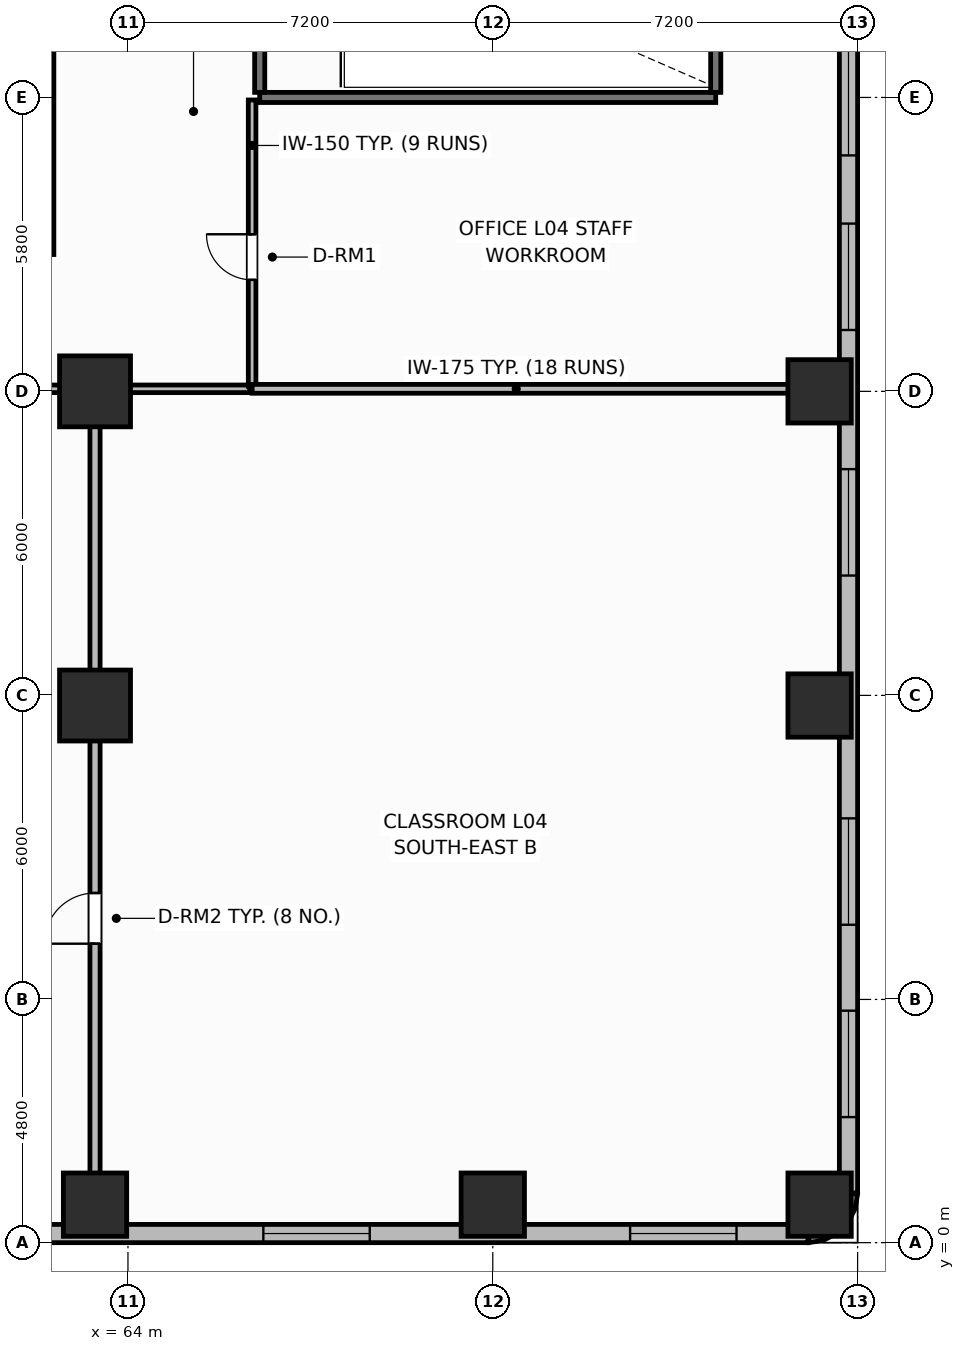
"""IFC4 building model, lengths in metres.
Left out: names, types, materials, properties, quantities, classifications, styles, units other than length and angle.
Written with IfcOpenShell. Run it as: python <this file> out.ifc"""

import sys

from ifc_helpers import new_model, si_unit, direction, frame, frame_2d, origin, origin_2d, place, context, subcontext, project, spatial, rectangle, extrude, element, fill, save


model = new_model("IFC4")
c1 = context("Model", 3, precision=1e-05, world=origin(), true_north=direction((0.0, 1.0)))
c2 = subcontext(c1, "Body", "Model", "MODEL_VIEW")
j1 = project(units=[si_unit("LENGTHUNIT", "METRE"), si_unit("PLANEANGLEUNIT", "RADIAN")], contexts=[c1])
p1 = place(None, origin())
s1 = spatial("IfcSite", under=j1, at=p1, CompositionType="ELEMENT")
p2 = place(p1, origin())
s2 = spatial("IfcBuilding", under=s1, at=p2, CompositionType="ELEMENT")
p3 = place(p2, frame((0.0, 0.0, 20.1)))
s3 = spatial("IfcBuildingStorey", under=s2, at=p3, CompositionType="ELEMENT", Elevation=20.1)
for number, where, z_axis, x_axis in (
    (1, (63.35, 0.75, 0.0), (0.0, 0.0, 1.0), (1.0, 0.0, 0.0)),
    (2, (71.2, 0.75, 0.0), (0.0, 0.0, 1.0), (1.0, 0.0, 0.0)),
    (3, (77.65, 0.75, 0.0), (0.0, 0.0, 1.0), (1.0, 0.0, 0.0)),
    (4, (77.65, 10.6, 0.0), (0.0, 0.0, 1.0), (1.0, 0.0, 0.0)),
    (5, (77.65, 16.8, 0.0), (0.0, 0.0, 1.0), (1.0, 0.0, 0.0)),
):
    element("IfcColumn", number, at=place(p3, frame(where, z_axis=z_axis, x_axis=x_axis)), inside=s3, PredefinedType="COLUMN", context=c2, shape_type="SweptSolid", body=[
        extrude(rectangle(XDim=1.25, YDim=1.25, at=origin_2d()), origin(), (0.0, 0.0, 1.0), 4.5),
    ])
for number, where, z_axis, x_axis in (
    (6, (63.35, 10.6, 0.0), (0.0, 0.0, 1.0), (1.0, 0.0, 0.0)),
    (7, (63.35, 16.8, 0.0), (0.0, 0.0, 1.0), (1.0, 0.0, 0.0)),
):
    element("IfcColumn", number, at=place(p3, frame(where, z_axis=z_axis, x_axis=x_axis)), inside=s3, PredefinedType="COLUMN", context=c2, shape_type="SweptSolid", body=[
        extrude(rectangle(XDim=1.4, YDim=1.4, at=origin_2d()), origin(), (0.0, 0.0, 1.0), 4.5),
    ])
p4 = place(p3, frame((21.83, 0.18, 0.0), z_axis=(0.0, 0.0, 1.0), x_axis=(1.0, 0.0, 0.0)))
e8 = element("IfcWall", 8, at=p4, inside=s3, PredefinedType="SOLIDWALL", context=c2, shape_type="SweptSolid", body=[
    extrude(rectangle(XDim=55.59, YDim=0.36, at=frame_2d((27.795, 0.0))), origin(), (0.0, 0.0, 1.0), 2.3),
])
p5 = place(p4, frame((5.029, 0.0, 0.3)))
e9 = element("IfcOpeningElement", 9, at=p5, cuts=e8, PredefinedType="OPENING", context=c2, shape_type="SweptSolid", body=[
    extrude(rectangle(XDim=2.1, YDim=2.2, at=frame_2d((1.05, 1.1))), frame((0.0, 0.19, 0.0), z_axis=(0.0, -1.0, 0.0), x_axis=(1.0, 0.0, 0.0)), (0.0, 0.0, 1.0), 0.38),
])
p6 = place(p4, frame((8.648, 0.0, 0.3)))
e10 = element("IfcOpeningElement", 10, at=p6, cuts=e8, PredefinedType="OPENING", context=c2, shape_type="SweptSolid", body=[
    extrude(rectangle(XDim=2.1, YDim=2.2, at=frame_2d((1.05, 1.1))), frame((0.0, 0.19, 0.0), z_axis=(0.0, -1.0, 0.0), x_axis=(1.0, 0.0, 0.0)), (0.0, 0.0, 1.0), 0.38),
])
p7 = place(p4, frame((12.268, 0.0, 0.3)))
e11 = element("IfcOpeningElement", 11, at=p7, cuts=e8, PredefinedType="OPENING", context=c2, shape_type="SweptSolid", body=[
    extrude(rectangle(XDim=2.1, YDim=2.2, at=frame_2d((1.05, 1.1))), frame((0.0, 0.19, 0.0), z_axis=(0.0, -1.0, 0.0), x_axis=(1.0, 0.0, 0.0)), (0.0, 0.0, 1.0), 0.38),
])
p8 = place(p4, frame((19.506, 0.0, 0.3)))
e12 = element("IfcOpeningElement", 12, at=p8, cuts=e8, PredefinedType="OPENING", context=c2, shape_type="SweptSolid", body=[
    extrude(rectangle(XDim=2.1, YDim=2.2, at=frame_2d((1.05, 1.1))), frame((0.0, 0.19, 0.0), z_axis=(0.0, -1.0, 0.0), x_axis=(1.0, 0.0, 0.0)), (0.0, 0.0, 1.0), 0.38),
])
p9 = place(p4, frame((23.126, 0.0, 0.3)))
e13 = element("IfcOpeningElement", 13, at=p9, cuts=e8, PredefinedType="OPENING", context=c2, shape_type="SweptSolid", body=[
    extrude(rectangle(XDim=2.1, YDim=2.2, at=frame_2d((1.05, 1.1))), frame((0.0, 0.19, 0.0), z_axis=(0.0, -1.0, 0.0), x_axis=(1.0, 0.0, 0.0)), (0.0, 0.0, 1.0), 0.38),
])
p10 = place(p4, frame((26.745, 0.0, 0.3)))
e14 = element("IfcOpeningElement", 14, at=p10, cuts=e8, PredefinedType="OPENING", context=c2, shape_type="SweptSolid", body=[
    extrude(rectangle(XDim=2.1, YDim=2.2, at=frame_2d((1.05, 1.1))), frame((0.0, 0.19, 0.0), z_axis=(0.0, -1.0, 0.0), x_axis=(1.0, 0.0, 0.0)), (0.0, 0.0, 1.0), 0.38),
])
p11 = place(p4, frame((33.984, 0.0, 0.3)))
e15 = element("IfcOpeningElement", 15, at=p11, cuts=e8, PredefinedType="OPENING", context=c2, shape_type="SweptSolid", body=[
    extrude(rectangle(XDim=2.1, YDim=2.2, at=frame_2d((1.05, 1.1))), frame((0.0, 0.19, 0.0), z_axis=(0.0, -1.0, 0.0), x_axis=(1.0, 0.0, 0.0)), (0.0, 0.0, 1.0), 0.38),
])
p12 = place(p4, frame((37.603, 0.0, 0.3)))
e16 = element("IfcOpeningElement", 16, at=p12, cuts=e8, PredefinedType="OPENING", context=c2, shape_type="SweptSolid", body=[
    extrude(rectangle(XDim=2.1, YDim=2.2, at=frame_2d((1.05, 1.1))), frame((0.0, 0.19, 0.0), z_axis=(0.0, -1.0, 0.0), x_axis=(1.0, 0.0, 0.0)), (0.0, 0.0, 1.0), 0.38),
])
p13 = place(p4, frame((44.842, 0.0, 0.3)))
e17 = element("IfcOpeningElement", 17, at=p13, cuts=e8, PredefinedType="OPENING", context=c2, shape_type="SweptSolid", body=[
    extrude(rectangle(XDim=2.1, YDim=2.2, at=frame_2d((1.05, 1.1))), frame((0.0, 0.19, 0.0), z_axis=(0.0, -1.0, 0.0), x_axis=(1.0, 0.0, 0.0)), (0.0, 0.0, 1.0), 0.38),
])
p14 = place(p4, frame((52.08, 0.0, 0.3)))
e18 = element("IfcOpeningElement", 18, at=p14, cuts=e8, PredefinedType="OPENING", context=c2, shape_type="SweptSolid", body=[
    extrude(rectangle(XDim=2.1, YDim=2.2, at=frame_2d((1.05, 1.1))), frame((0.0, 0.19, 0.0), z_axis=(0.0, -1.0, 0.0), x_axis=(1.0, 0.0, 0.0)), (0.0, 0.0, 1.0), 0.38),
])
p15 = place(p3, frame((77.42, 0.18, 0.0), z_axis=(0.0, 0.0, 1.0), x_axis=(0.987604361038, 0.156963773077, 0.0)))
e19 = element("IfcWall", 19, at=p15, inside=s3, PredefinedType="SOLIDWALL", context=c2, shape_type="SweptSolid", body=[
    extrude(rectangle(XDim=0.25, YDim=0.36, at=frame_2d((0.125, 0.0))), origin(), (0.0, 0.0, 1.0), 2.3),
])
for number, where, z_axis, x_axis in (
    (20, (77.667, 0.219, 0.0), (0.0, 0.0, 1.0), (0.891, 0.454, 0.0)),
    (21, (77.89, 0.333, 0.0), (0.0, 0.0, 1.0), (0.707, 0.707, 0.0)),
):
    element("IfcWall", number, at=place(p3, frame(where, z_axis=z_axis, x_axis=x_axis)), inside=s3, PredefinedType="SOLIDWALL", context=c2, shape_type="SweptSolid", body=[
        extrude(rectangle(XDim=0.25, YDim=0.36, at=frame_2d((0.125, 0.0))), origin(), (0.0, 0.0, 1.0), 2.3),
    ])
p16 = place(p3, frame((78.067, 0.51, 0.0), z_axis=(0.0, 0.0, 1.0), x_axis=(0.454217786225, 0.89089067942, 0.0)))
e22 = element("IfcWall", 22, at=p16, inside=s3, PredefinedType="SOLIDWALL", context=c2, shape_type="SweptSolid", body=[
    extrude(rectangle(XDim=0.25, YDim=0.36, at=frame_2d((0.125, 0.0))), origin(), (0.0, 0.0, 1.0), 2.3),
])
p17 = place(p3, frame((78.181, 0.733, 0.0), z_axis=(0.0, 0.0, 1.0), x_axis=(0.156163049852, 0.987731290312, 0.0)))
e23 = element("IfcWall", 23, at=p17, inside=s3, PredefinedType="SOLIDWALL", context=c2, shape_type="SweptSolid", body=[
    extrude(rectangle(XDim=0.25, YDim=0.36, at=frame_2d((0.125, 0.0))), origin(), (0.0, 0.0, 1.0), 2.3),
])
p18 = place(p3, frame((78.22, 0.98, 0.0), z_axis=(0.0, 0.0, 1.0), x_axis=(0.0, 1.0, 0.0)))
e24 = element("IfcWall", 24, at=p18, inside=s3, PredefinedType="SOLIDWALL", context=c2, shape_type="SweptSolid", body=[
    extrude(rectangle(XDim=54.44, YDim=0.36, at=frame_2d((27.22, 0.0))), origin(), (0.0, 0.0, 1.0), 2.3),
])
p19 = place(p18, frame((1.498, 0.0, 0.3)))
e25 = element("IfcOpeningElement", 25, at=p19, cuts=e24, PredefinedType="OPENING", context=c2, shape_type="SweptSolid", body=[
    extrude(rectangle(XDim=2.1, YDim=2.2, at=frame_2d((1.05, 1.1))), frame((0.0, 0.19, 0.0), z_axis=(0.0, -1.0, 0.0), x_axis=(1.0, 0.0, 0.0)), (0.0, 0.0, 1.0), 0.38),
])
p20 = place(p18, frame((5.294, 0.0, 0.3)))
e26 = element("IfcOpeningElement", 26, at=p20, cuts=e24, PredefinedType="OPENING", context=c2, shape_type="SweptSolid", body=[
    extrude(rectangle(XDim=2.1, YDim=2.2, at=frame_2d((1.05, 1.1))), frame((0.0, 0.19, 0.0), z_axis=(0.0, -1.0, 0.0), x_axis=(1.0, 0.0, 0.0)), (0.0, 0.0, 1.0), 0.38),
])
p21 = place(p18, frame((12.185, 0.0, 0.3)))
e27 = element("IfcOpeningElement", 27, at=p21, cuts=e24, PredefinedType="OPENING", context=c2, shape_type="SweptSolid", body=[
    extrude(rectangle(XDim=2.1, YDim=2.2, at=frame_2d((1.05, 1.1))), frame((0.0, 0.19, 0.0), z_axis=(0.0, -1.0, 0.0), x_axis=(1.0, 0.0, 0.0)), (0.0, 0.0, 1.0), 0.38),
])
p22 = place(p18, frame((17.031, 0.0, 0.3)))
e28 = element("IfcOpeningElement", 28, at=p22, cuts=e24, PredefinedType="OPENING", context=c2, shape_type="SweptSolid", body=[
    extrude(rectangle(XDim=2.1, YDim=2.2, at=frame_2d((1.05, 1.1))), frame((0.0, 0.19, 0.0), z_axis=(0.0, -1.0, 0.0), x_axis=(1.0, 0.0, 0.0)), (0.0, 0.0, 1.0), 0.38),
])
p23 = place(p18, frame((20.476, 0.0, 0.3)))
e29 = element("IfcOpeningElement", 29, at=p23, cuts=e24, PredefinedType="OPENING", context=c2, shape_type="SweptSolid", body=[
    extrude(rectangle(XDim=2.1, YDim=2.2, at=frame_2d((1.05, 1.1))), frame((0.0, 0.19, 0.0), z_axis=(0.0, -1.0, 0.0), x_axis=(1.0, 0.0, 0.0)), (0.0, 0.0, 1.0), 0.38),
])
p24 = place(p18, frame((23.572, 0.0, 0.3)))
e30 = element("IfcOpeningElement", 30, at=p24, cuts=e24, PredefinedType="OPENING", context=c2, shape_type="SweptSolid", body=[
    extrude(rectangle(XDim=2.1, YDim=2.2, at=frame_2d((1.05, 1.1))), frame((0.0, 0.19, 0.0), z_axis=(0.0, -1.0, 0.0), x_axis=(1.0, 0.0, 0.0)), (0.0, 0.0, 1.0), 0.38),
])
p25 = place(p18, frame((28.768, 0.0, 0.3)))
e31 = element("IfcOpeningElement", 31, at=p25, cuts=e24, PredefinedType="OPENING", context=c2, shape_type="SweptSolid", body=[
    extrude(rectangle(XDim=2.1, YDim=2.2, at=frame_2d((1.05, 1.1))), frame((0.0, 0.19, 0.0), z_axis=(0.0, -1.0, 0.0), x_axis=(1.0, 0.0, 0.0)), (0.0, 0.0, 1.0), 0.38),
])
p26 = place(p18, frame((31.864, 0.0, 0.3)))
e32 = element("IfcOpeningElement", 32, at=p26, cuts=e24, PredefinedType="OPENING", context=c2, shape_type="SweptSolid", body=[
    extrude(rectangle(XDim=2.1, YDim=2.2, at=frame_2d((1.05, 1.1))), frame((0.0, 0.19, 0.0), z_axis=(0.0, -1.0, 0.0), x_axis=(1.0, 0.0, 0.0)), (0.0, 0.0, 1.0), 0.38),
])
p27 = place(p18, frame((35.309, 0.0, 0.3)))
e33 = element("IfcOpeningElement", 33, at=p27, cuts=e24, PredefinedType="OPENING", context=c2, shape_type="SweptSolid", body=[
    extrude(rectangle(XDim=2.1, YDim=2.2, at=frame_2d((1.05, 1.1))), frame((0.0, 0.19, 0.0), z_axis=(0.0, -1.0, 0.0), x_axis=(1.0, 0.0, 0.0)), (0.0, 0.0, 1.0), 0.38),
])
p28 = place(p18, frame((40.155, 0.0, 0.3)))
e34 = element("IfcOpeningElement", 34, at=p28, cuts=e24, PredefinedType="OPENING", context=c2, shape_type="SweptSolid", body=[
    extrude(rectangle(XDim=2.1, YDim=2.2, at=frame_2d((1.05, 1.1))), frame((0.0, 0.19, 0.0), z_axis=(0.0, -1.0, 0.0), x_axis=(1.0, 0.0, 0.0)), (0.0, 0.0, 1.0), 0.38),
])
p29 = place(p18, frame((47.046, 0.0, 0.3)))
e35 = element("IfcOpeningElement", 35, at=p29, cuts=e24, PredefinedType="OPENING", context=c2, shape_type="SweptSolid", body=[
    extrude(rectangle(XDim=2.1, YDim=2.2, at=frame_2d((1.05, 1.1))), frame((0.0, 0.19, 0.0), z_axis=(0.0, -1.0, 0.0), x_axis=(1.0, 0.0, 0.0)), (0.0, 0.0, 1.0), 0.38),
])
p30 = place(p18, frame((50.842, 0.0, 0.3)))
e36 = element("IfcOpeningElement", 36, at=p30, cuts=e24, PredefinedType="OPENING", context=c2, shape_type="SweptSolid", body=[
    extrude(rectangle(XDim=2.1, YDim=2.2, at=frame_2d((1.05, 1.1))), frame((0.0, 0.19, 0.0), z_axis=(0.0, -1.0, 0.0), x_axis=(1.0, 0.0, 0.0)), (0.0, 0.0, 1.0), 0.38),
])
p31 = place(p3, frame((66.6, 22.6, 0.0), z_axis=(0.0, 0.0, 1.0), x_axis=(1.0, 0.0, 0.0)))
e37 = element("IfcWall", 37, at=p31, inside=s3, PredefinedType="SHEAR", context=c2, shape_type="SweptSolid", body=[
    extrude(rectangle(XDim=9.0, YDim=0.2, at=frame_2d((4.5, 0.0))), origin(), (0.0, 0.0, 1.0), 4.5),
])
for number, where, z_axis, x_axis in (
    (38, (66.6, 22.7, 0.0), (0.0, 0.0, 1.0), (0.0, 1.0, 0.0)),
    (39, (75.6, 22.7, 0.0), (0.0, 0.0, 1.0), (0.0, 1.0, 0.0)),
):
    element("IfcWall", number, at=place(p3, frame(where, z_axis=z_axis, x_axis=x_axis)), inside=s3, PredefinedType="SHEAR", context=c2, shape_type="SweptSolid", body=[
        extrude(rectangle(XDim=3.4, YDim=0.2, at=frame_2d((1.7, 0.0))), origin(), (0.0, 0.0, 1.0), 4.5),
    ])
p32 = place(p3, frame((62.45, 19.5, 0.0), z_axis=(0.0, 0.0, 1.0), x_axis=(0.0, 1.0, 0.0)))
e40 = element("IfcWall", 40, at=p32, inside=s3, PredefinedType="PARTITIONING", context=c2, shape_type="SweptSolid", body=[
    extrude(rectangle(XDim=17.4, YDim=0.175, at=frame_2d((8.7, 0.0))), origin(), (0.0, 0.0, 1.0), 2.26),
])
p33 = place(p3, frame((63.35, 0.4, 0.0), z_axis=(0.0, 0.0, 1.0), x_axis=(0.0, 1.0, 0.0)))
e41 = element("IfcWall", 41, at=p33, inside=s3, PredefinedType="PARTITIONING", context=c2, shape_type="SweptSolid", body=[
    extrude(rectangle(XDim=16.4, YDim=0.2, at=frame_2d((8.2, 0.0))), origin(), (0.0, 0.0, 1.0), 2.26),
])
p34 = place(p33, frame((5.5, 0.0, 0.0)))
e42 = element("IfcOpeningElement", 42, at=p34, cuts=e41, PredefinedType="OPENING", context=c2, shape_type="SweptSolid", body=[
    extrude(rectangle(XDim=1.0, YDim=2.15, at=frame_2d((0.5, 1.075))), frame((0.0, 0.11, 0.0), z_axis=(0.0, -1.0, 0.0), x_axis=(1.0, 0.0, 0.0)), (0.0, 0.0, 1.0), 0.22),
])
p35 = place(p3, frame((53.15, 16.85, 0.0), z_axis=(0.0, 0.0, 1.0), x_axis=(1.0, 0.0, 0.0)))
e43 = element("IfcWall", 43, at=p35, inside=s3, PredefinedType="PARTITIONING", context=c2, shape_type="SweptSolid", body=[
    extrude(rectangle(XDim=13.25, YDim=0.15, at=frame_2d((6.625, 0.0))), origin(), (0.0, 0.0, 1.0), 2.26),
])
p36 = place(p35, frame((4.2, 0.0, 0.0)))
e44 = element("IfcOpeningElement", 44, at=p36, cuts=e43, PredefinedType="OPENING", context=c2, shape_type="SweptSolid", body=[
    extrude(rectangle(XDim=1.0, YDim=2.15, at=frame_2d((0.5, 1.075))), frame((0.0, 0.085, 0.0), z_axis=(0.0, -1.0, 0.0), x_axis=(1.0, 0.0, 0.0)), (0.0, 0.0, 1.0), 0.17),
])
p37 = place(p3, frame((66.45, 16.9, 0.0), z_axis=(0.0, 0.0, 1.0), x_axis=(0.0, 1.0, 0.0)))
e45 = element("IfcWall", 45, at=p37, inside=s3, PredefinedType="PARTITIONING", context=c2, shape_type="SweptSolid", body=[
    extrude(rectangle(XDim=5.65, YDim=0.15, at=frame_2d((2.825, 0.0))), origin(), (0.0, 0.0, 1.0), 2.26),
])
p38 = place(p37, frame((2.1, 0.0, 0.0)))
e46 = element("IfcOpeningElement", 46, at=p38, cuts=e45, PredefinedType="OPENING", context=c2, shape_type="SweptSolid", body=[
    extrude(rectangle(XDim=0.9, YDim=2.1, at=frame_2d((0.45, 1.05))), frame((0.0, 0.085, 0.0), z_axis=(0.0, -1.0, 0.0), x_axis=(1.0, 0.0, 0.0)), (0.0, 0.0, 1.0), 0.17),
])
p39 = place(p3, frame((66.45, 16.85, 0.0), z_axis=(0.0, 0.0, 1.0), x_axis=(1.0, 0.0, 0.0)))
e47 = element("IfcWall", 47, at=p39, inside=s3, PredefinedType="PARTITIONING", context=c2, shape_type="SweptSolid", body=[
    extrude(rectangle(XDim=11.55, YDim=0.175, at=frame_2d((5.775, 0.0))), origin(), (0.0, 0.0, 1.0), 2.26),
])
p40 = place(p13, origin())
e48 = element("IfcWindow", 48, at=p40, inside=s3, PartitioningType="SINGLE_PANEL", PredefinedType="WINDOW", context=c2, shape_type="SweptSolid", body=[
    extrude(rectangle(XDim=2.1, YDim=2.2, at=frame_2d((1.05, 1.1))), frame((0.0, 0.03, 0.0), z_axis=(0.0, -1.0, 0.0), x_axis=(1.0, 0.0, 0.0)), (0.0, 0.0, 1.0), 0.06),
])
fill(e17, e48)
p41 = place(p14, origin())
e49 = element("IfcWindow", 49, at=p41, inside=s3, PartitioningType="SINGLE_PANEL", PredefinedType="WINDOW", context=c2, shape_type="SweptSolid", body=[
    extrude(rectangle(XDim=2.1, YDim=2.2, at=frame_2d((1.05, 1.1))), frame((0.0, 0.03, 0.0), z_axis=(0.0, -1.0, 0.0), x_axis=(1.0, 0.0, 0.0)), (0.0, 0.0, 1.0), 0.06),
])
fill(e18, e49)
p42 = place(p19, origin())
e50 = element("IfcWindow", 50, at=p42, inside=s3, PartitioningType="SINGLE_PANEL", PredefinedType="WINDOW", context=c2, shape_type="SweptSolid", body=[
    extrude(rectangle(XDim=2.1, YDim=2.2, at=frame_2d((1.05, 1.1))), frame((0.0, 0.03, 0.0), z_axis=(0.0, -1.0, 0.0), x_axis=(1.0, 0.0, 0.0)), (0.0, 0.0, 1.0), 0.06),
])
fill(e25, e50)
p43 = place(p20, origin())
e51 = element("IfcWindow", 51, at=p43, inside=s3, PartitioningType="SINGLE_PANEL", PredefinedType="WINDOW", context=c2, shape_type="SweptSolid", body=[
    extrude(rectangle(XDim=2.1, YDim=2.2, at=frame_2d((1.05, 1.1))), frame((0.0, 0.03, 0.0), z_axis=(0.0, -1.0, 0.0), x_axis=(1.0, 0.0, 0.0)), (0.0, 0.0, 1.0), 0.06),
])
fill(e26, e51)
p44 = place(p21, origin())
e52 = element("IfcWindow", 52, at=p44, inside=s3, PartitioningType="SINGLE_PANEL", PredefinedType="WINDOW", context=c2, shape_type="SweptSolid", body=[
    extrude(rectangle(XDim=2.1, YDim=2.2, at=frame_2d((1.05, 1.1))), frame((0.0, 0.03, 0.0), z_axis=(0.0, -1.0, 0.0), x_axis=(1.0, 0.0, 0.0)), (0.0, 0.0, 1.0), 0.06),
])
fill(e27, e52)
p45 = place(p22, origin())
e53 = element("IfcWindow", 53, at=p45, inside=s3, PartitioningType="SINGLE_PANEL", PredefinedType="WINDOW", context=c2, shape_type="SweptSolid", body=[
    extrude(rectangle(XDim=2.1, YDim=2.2, at=frame_2d((1.05, 1.1))), frame((0.0, 0.03, 0.0), z_axis=(0.0, -1.0, 0.0), x_axis=(1.0, 0.0, 0.0)), (0.0, 0.0, 1.0), 0.06),
])
fill(e28, e53)
p46 = place(p23, origin())
e54 = element("IfcWindow", 54, at=p46, inside=s3, PartitioningType="SINGLE_PANEL", PredefinedType="WINDOW", context=c2, shape_type="SweptSolid", body=[
    extrude(rectangle(XDim=2.1, YDim=2.2, at=frame_2d((1.05, 1.1))), frame((0.0, 0.03, 0.0), z_axis=(0.0, -1.0, 0.0), x_axis=(1.0, 0.0, 0.0)), (0.0, 0.0, 1.0), 0.06),
])
fill(e29, e54)
p47 = place(p34, origin())
e55 = element("IfcDoor", 55, at=p47, inside=s3, OperationType="SINGLE_SWING_LEFT", PredefinedType="DOOR", context=c2, shape_type="SweptSolid", body=[
    extrude(rectangle(XDim=1.0, YDim=2.15, at=frame_2d((0.5, 1.075))), frame((0.0, 0.025, 0.0), z_axis=(0.0, -1.0, 0.0), x_axis=(1.0, 0.0, 0.0)), (0.0, 0.0, 1.0), 0.05),
])
fill(e42, e55)
p48 = place(p38, origin())
e56 = element("IfcDoor", 56, at=p48, inside=s3, OperationType="SINGLE_SWING_RIGHT", PredefinedType="DOOR", context=c2, shape_type="SweptSolid", body=[
    extrude(rectangle(XDim=0.9, YDim=2.1, at=frame_2d((0.45, 1.05))), frame((0.0, 0.025, 0.0), z_axis=(0.0, -1.0, 0.0), x_axis=(1.0, 0.0, 0.0)), (0.0, 0.0, 1.0), 0.05),
])
fill(e46, e56)
save(model, sys.argv[1])
